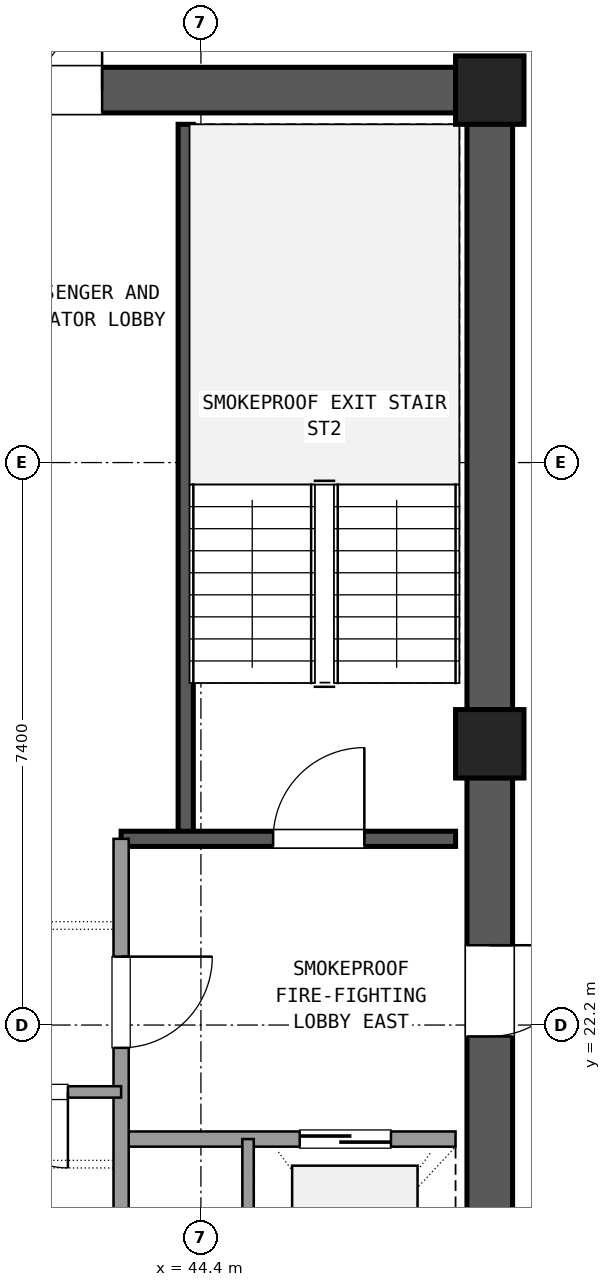
"""IFC4 building model, lengths in metres.
Left out: names, types, materials, properties, quantities, classifications, styles, units other than length and angle.
Written with IfcOpenShell. Run it as: python <this file> out.ifc"""

import sys

from ifc_helpers import new_model, si_unit, direction, frame, frame_2d, origin, origin_2d, place, context, subcontext, project, spatial, rectangle, extrude, element, fill, save


model = new_model("IFC4")
c1 = context("Model", 3, precision=1e-05, world=origin(), true_north=direction((0.0, 1.0)))
c2 = subcontext(c1, "Body", "Model", "MODEL_VIEW")
j1 = project(units=[si_unit("LENGTHUNIT", "METRE"), si_unit("PLANEANGLEUNIT", "RADIAN")], contexts=[c1])
p1 = place(None, origin())
s1 = spatial("IfcSite", under=j1, at=p1, CompositionType="ELEMENT")
p2 = place(p1, origin())
s2 = spatial("IfcBuilding", under=s1, at=p2, CompositionType="ELEMENT")
p3 = place(p2, frame((0.0, 0.0, 217.98)))
s3 = spatial("IfcBuildingStorey", under=s2, at=p3, CompositionType="ELEMENT", Elevation=217.98)
for number, where, z_axis, x_axis in (
    (1, (48.2, 25.9, 0.0), (0.0, 0.0, 1.0), (1.0, 0.0, 0.0)),
    (2, (48.2, 34.5, 0.0), (0.0, 0.0, 1.0), (1.0, 0.0, 0.0)),
):
    element("IfcColumn", number, at=place(p3, frame(where, z_axis=z_axis, x_axis=x_axis)), inside=s3, PredefinedType="COLUMN", context=c2, shape_type="SweptSolid", body=[
        extrude(rectangle(XDim=0.9, YDim=0.9, at=origin_2d()), origin(), (0.0, 0.0, 1.0), 3.6),
    ])
p4 = place(p3, frame((48.2, 17.745, 0.0), z_axis=(0.0, 0.0, 1.0), x_axis=(0.0, 1.0, 0.0)))
e3 = element("IfcWall", 3, at=p4, inside=s3, PredefinedType="SHEAR", context=c2, shape_type="SweptSolid", body=[
    extrude(rectangle(XDim=7.71, YDim=0.6, at=frame_2d((3.855, 0.0))), origin(), (0.0, 0.0, 1.0), 3.32),
])
p5 = place(p4, frame((4.305, 0.0, 0.0)))
e4 = element("IfcOpeningElement", 4, at=p5, cuts=e3, PredefinedType="OPENING", context=c2, shape_type="SweptSolid", body=[
    extrude(rectangle(XDim=1.2, YDim=2.15, at=frame_2d((0.6, 1.075))), frame((0.0, 0.31, 0.0), z_axis=(0.0, -1.0, 0.0), x_axis=(1.0, 0.0, 0.0)), (0.0, 0.0, 1.0), 0.62),
])
p6 = place(p3, frame((48.2, 26.345, 0.0), z_axis=(0.0, 0.0, 1.0), x_axis=(0.0, 1.0, 0.0)))
e5 = element("IfcWall", 5, at=p6, inside=s3, PredefinedType="SHEAR", context=c2, shape_type="SweptSolid", body=[
    extrude(rectangle(XDim=7.71, YDim=0.6, at=frame_2d((3.855, 0.0))), origin(), (0.0, 0.0, 1.0), 3.32),
])
p7 = place(p3, frame((47.755, 34.5, 0.0), z_axis=(0.0, 0.0, 1.0), x_axis=(-1.0, 0.0, 0.0)))
e6 = element("IfcWall", 6, at=p7, inside=s3, PredefinedType="SHEAR", context=c2, shape_type="SweptSolid", body=[
    extrude(rectangle(XDim=10.31, YDim=0.6, at=frame_2d((5.155, 0.0))), origin(), (0.0, 0.0, 1.0), 3.32),
])
p8 = place(p7, frame((4.655, 0.0, 0.0)))
e7 = element("IfcOpeningElement", 7, at=p8, cuts=e6, PredefinedType="OPENING", context=c2, shape_type="SweptSolid", body=[
    extrude(rectangle(XDim=1.6, YDim=2.2, at=frame_2d((0.8, 1.1))), frame((0.0, 0.31, 0.0), z_axis=(0.0, -1.0, 0.0), x_axis=(1.0, 0.0, 0.0)), (0.0, 0.0, 1.0), 0.62),
])
p9 = place(p3, frame((44.2, 24.65, 0.0), z_axis=(0.0, 0.0, 1.0), x_axis=(0.0, 1.0, 0.0)))
e8 = element("IfcWall", 8, at=p9, inside=s3, PredefinedType="SHEAR", context=c2, shape_type="SweptSolid", body=[
    extrude(rectangle(XDim=9.4, YDim=0.2, at=frame_2d((4.7, 0.0))), origin(), (0.0, 0.0, 1.0), 3.32),
])
p10 = place(p3, frame((43.35, 24.65, 0.0), z_axis=(0.0, 0.0, 1.0), x_axis=(1.0, 0.0, 0.0)))
e9 = element("IfcWall", 9, at=p10, inside=s3, PredefinedType="SHEAR", context=c2, shape_type="SweptSolid", body=[
    extrude(rectangle(XDim=4.4, YDim=0.2, at=frame_2d((2.2, 0.0))), origin(), (0.0, 0.0, 1.0), 3.32),
])
p11 = place(p10, frame((2.0, 0.0, 0.0)))
e10 = element("IfcOpeningElement", 10, at=p11, cuts=e9, PredefinedType="OPENING", context=c2, shape_type="SweptSolid", body=[
    extrude(rectangle(XDim=1.2, YDim=2.15, at=frame_2d((0.6, 1.075))), frame((0.0, 0.11, 0.0), z_axis=(0.0, -1.0, 0.0), x_axis=(1.0, 0.0, 0.0)), (0.0, 0.0, 1.0), 0.22),
])
p12 = place(p3, frame((43.35, 20.7, 0.0), z_axis=(0.0, 0.0, 1.0), x_axis=(1.0, 0.0, 0.0)))
e11 = element("IfcWall", 11, at=p12, inside=s3, PredefinedType="SOLIDWALL", context=c2, shape_type="SweptSolid", body=[
    extrude(rectangle(XDim=4.4, YDim=0.2, at=frame_2d((2.2, 0.0))), origin(), (0.0, 0.0, 1.0), 2.61),
])
p13 = place(p12, frame((2.35, 0.0, 0.0)))
e12 = element("IfcOpeningElement", 12, at=p13, cuts=e11, PredefinedType="OPENING", context=c2, shape_type="SweptSolid", body=[
    extrude(rectangle(XDim=1.2, YDim=2.15, at=frame_2d((0.6, 1.075))), frame((0.0, 0.11, 0.0), z_axis=(0.0, -1.0, 0.0), x_axis=(1.0, 0.0, 0.0)), (0.0, 0.0, 1.0), 0.22),
])
p14 = place(p3, frame((43.35, 17.75, 0.0), z_axis=(0.0, 0.0, 1.0), x_axis=(0.0, 1.0, 0.0)))
e13 = element("IfcWall", 13, at=p14, inside=s3, PredefinedType="SOLIDWALL", context=c2, shape_type="SweptSolid", body=[
    extrude(rectangle(XDim=6.9, YDim=0.2, at=frame_2d((3.45, 0.0))), origin(), (0.0, 0.0, 1.0), 2.61),
])
p15 = place(p14, frame((4.15, 0.0, 0.0)))
e14 = element("IfcOpeningElement", 14, at=p15, cuts=e13, PredefinedType="OPENING", context=c2, shape_type="SweptSolid", body=[
    extrude(rectangle(XDim=1.2, YDim=2.15, at=frame_2d((0.6, 1.075))), frame((0.0, 0.11, 0.0), z_axis=(0.0, -1.0, 0.0), x_axis=(1.0, 0.0, 0.0)), (0.0, 0.0, 1.0), 0.22),
])
p16 = place(p3, frame((45.02, 17.75, 0.0), z_axis=(0.0, 0.0, 1.0), x_axis=(0.0, 1.0, 0.0)))
e15 = element("IfcWall", 15, at=p16, inside=s3, PredefinedType="PARTITIONING", context=c2, shape_type="SweptSolid", body=[
    extrude(rectangle(XDim=2.95, YDim=0.15, at=frame_2d((1.475, 0.0))), origin(), (0.0, 0.0, 1.0), 2.61),
])
p17 = place(p3, frame((37.25, 21.32, 0.0), z_axis=(0.0, 0.0, 1.0), x_axis=(1.0, 0.0, 0.0)))
e16 = element("IfcWall", 16, at=p17, inside=s3, PredefinedType="PARTITIONING", context=c2, shape_type="SweptSolid", body=[
    extrude(rectangle(XDim=6.1, YDim=0.15, at=frame_2d((3.05, 0.0))), origin(), (0.0, 0.0, 1.0), 2.61),
])
p18 = place(p17, frame((0.55, 0.0, 0.0)))
e17 = element("IfcOpeningElement", 17, at=p18, cuts=e16, PredefinedType="OPENING", context=c2, shape_type="SweptSolid", body=[
    extrude(rectangle(XDim=1.0, YDim=2.15, at=frame_2d((0.5, 1.075))), frame((0.0, 0.085, 0.0), z_axis=(0.0, -1.0, 0.0), x_axis=(1.0, 0.0, 0.0)), (0.0, 0.0, 1.0), 0.17),
])
p19 = place(p17, frame((4.4, 0.0, 0.0)))
e18 = element("IfcOpeningElement", 18, at=p19, cuts=e16, PredefinedType="OPENING", context=c2, shape_type="SweptSolid", body=[
    extrude(rectangle(XDim=1.0, YDim=2.15, at=frame_2d((0.5, 1.075))), frame((0.0, 0.085, 0.0), z_axis=(0.0, -1.0, 0.0), x_axis=(1.0, 0.0, 0.0)), (0.0, 0.0, 1.0), 0.17),
])
p20 = place(p11, origin())
e19 = element("IfcDoor", 19, at=p20, inside=s3, OperationType="SINGLE_SWING_RIGHT", PredefinedType="DOOR", context=c2, shape_type="SweptSolid", body=[
    extrude(rectangle(XDim=1.2, YDim=2.15, at=frame_2d((0.6, 1.075))), frame((0.0, 0.025, 0.0), z_axis=(0.0, -1.0, 0.0), x_axis=(1.0, 0.0, 0.0)), (0.0, 0.0, 1.0), 0.05),
])
fill(e10, e19)
p21 = place(p13, origin())
e20 = element("IfcDoor", 20, at=p21, inside=s3, OperationType="SLIDING_TO_RIGHT", PredefinedType="DOOR", context=c2, shape_type="SweptSolid", body=[
    extrude(rectangle(XDim=1.2, YDim=2.15, at=frame_2d((0.6, 1.075))), frame((0.0, 0.025, 0.0), z_axis=(0.0, -1.0, 0.0), x_axis=(1.0, 0.0, 0.0)), (0.0, 0.0, 1.0), 0.05),
])
fill(e12, e20)
p22 = place(p15, frame((1.2, 0.0, 0.0), z_axis=(0.0, 0.0, 1.0), x_axis=(-1.0, 0.0, 0.0)))
e21 = element("IfcDoor", 21, at=p22, inside=s3, OperationType="SINGLE_SWING_RIGHT", PredefinedType="DOOR", context=c2, shape_type="SweptSolid", body=[
    extrude(rectangle(XDim=1.2, YDim=2.15, at=frame_2d((0.6, 1.075))), frame((0.0, 0.025, 0.0), z_axis=(0.0, -1.0, 0.0), x_axis=(1.0, 0.0, 0.0)), (0.0, 0.0, 1.0), 0.05),
])
fill(e14, e21)
p23 = place(p5, frame((1.2, 0.0, 0.0), z_axis=(0.0, 0.0, 1.0), x_axis=(-1.0, 0.0, 0.0)))
e22 = element("IfcDoor", 22, at=p23, inside=s3, OperationType="SINGLE_SWING_RIGHT", PredefinedType="DOOR", context=c2, shape_type="SweptSolid", body=[
    extrude(rectangle(XDim=1.2, YDim=2.15, at=frame_2d((0.6, 1.075))), frame((0.0, 0.025, 0.0), z_axis=(0.0, -1.0, 0.0), x_axis=(1.0, 0.0, 0.0)), (0.0, 0.0, 1.0), 0.05),
])
fill(e4, e22)
p24 = place(p8, frame((1.6, 0.0, 0.0), z_axis=(0.0, 0.0, 1.0), x_axis=(-1.0, 0.0, 0.0)))
e23 = element("IfcDoor", 23, at=p24, inside=s3, OperationType="DOUBLE_DOOR_SINGLE_SWING", PredefinedType="DOOR", context=c2, shape_type="SweptSolid", body=[
    extrude(rectangle(XDim=1.6, YDim=2.2, at=frame_2d((0.8, 1.1))), frame((0.0, 0.025, 0.0), z_axis=(0.0, -1.0, 0.0), x_axis=(1.0, 0.0, 0.0)), (0.0, 0.0, 1.0), 0.05),
])
fill(e7, e23)
p25 = place(p19, frame((1.0, 0.0, 0.0), z_axis=(0.0, 0.0, 1.0), x_axis=(-1.0, 0.0, 0.0)))
e24 = element("IfcDoor", 24, at=p25, inside=s3, OperationType="SINGLE_SWING_RIGHT", PredefinedType="DOOR", context=c2, shape_type="SweptSolid", body=[
    extrude(rectangle(XDim=1.0, YDim=2.15, at=frame_2d((0.5, 1.075))), frame((0.0, 0.025, 0.0), z_axis=(0.0, -1.0, 0.0), x_axis=(1.0, 0.0, 0.0)), (0.0, 0.0, 1.0), 0.05),
])
fill(e18, e24)
save(model, sys.argv[1])
